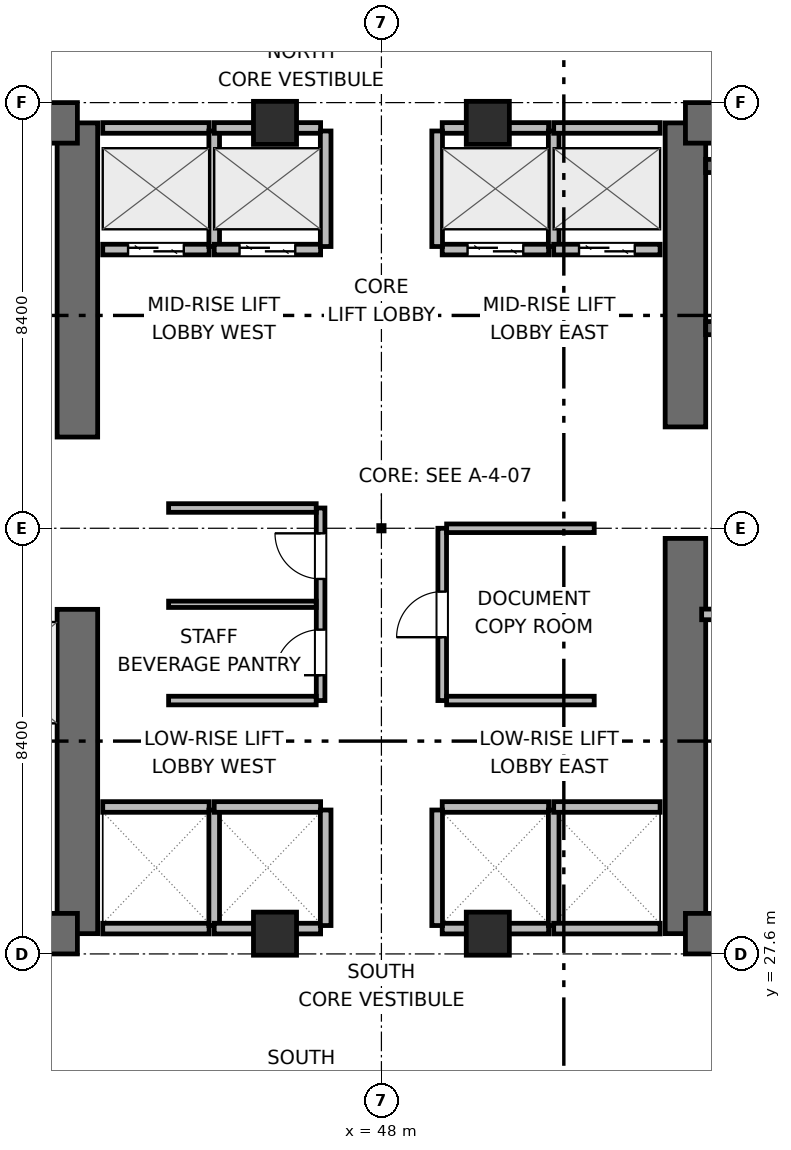
"""IFC4 building model, lengths in metres.
Left out: names, types, materials, properties, quantities, classifications, styles, units other than length and angle.
Written with IfcOpenShell. Run it as: python <this file> out.ifc"""

import sys

from ifc_helpers import new_model, si_unit, direction, frame, frame_2d, origin, origin_2d, place, context, subcontext, project, spatial, rectangle, extrude, element, fill, save


model = new_model("IFC4")
c1 = context("Model", 3, precision=1e-05, world=origin(), true_north=direction((0.0, 1.0)))
c2 = subcontext(c1, "Body", "Model", "MODEL_VIEW")
j1 = project(units=[si_unit("LENGTHUNIT", "METRE"), si_unit("PLANEANGLEUNIT", "RADIAN")], contexts=[c1])
p1 = place(None, origin())
s1 = spatial("IfcSite", under=j1, at=p1, CompositionType="ELEMENT")
p2 = place(p1, origin())
s2 = spatial("IfcBuilding", under=s1, at=p2, CompositionType="ELEMENT")
p3 = place(p2, frame((0.0, 0.0, 120.9)))
s3 = spatial("IfcBuildingStorey", under=s2, at=p3, CompositionType="ELEMENT", Elevation=120.9)
p4 = place(p3, frame((42.0, 28.0, 0.0), z_axis=(0.0, 0.0, 1.0), x_axis=(0.0, 1.0, 0.0)))
e1 = element("IfcWall", 1, at=p4, inside=s3, PredefinedType="SHEAR", context=c2, shape_type="SweptSolid", body=[
    extrude(rectangle(XDim=6.4, YDim=0.8, at=frame_2d((3.2, 0.0))), origin(), (0.0, 0.0, 1.0), 4.5),
])
p5 = place(p3, frame((42.0, 37.8, 0.0), z_axis=(0.0, 0.0, 1.0), x_axis=(0.0, 1.0, 0.0)))
e2 = element("IfcWall", 2, at=p5, inside=s3, PredefinedType="SHEAR", context=c2, shape_type="SweptSolid", body=[
    extrude(rectangle(XDim=6.2, YDim=0.8, at=frame_2d((3.1, 0.0))), origin(), (0.0, 0.0, 1.0), 4.5),
])
p6 = place(p3, frame((32.8, 28.0, 0.0), z_axis=(0.0, 0.0, 1.0), x_axis=(1.0, 0.0, 0.0)))
e3 = element("IfcWall", 3, at=p6, inside=s3, PredefinedType="SHEAR", context=c2, shape_type="SweptSolid", body=[
    extrude(rectangle(XDim=9.2, YDim=0.8, at=frame_2d((4.6, 0.0))), origin(), (0.0, 0.0, 1.0), 4.5),
])
p7 = place(p6, frame((4.975, 0.0, 0.0)))
e4 = element("IfcOpeningElement", 4, at=p7, cuts=e3, PredefinedType="OPENING", context=c2, shape_type="SweptSolid", body=[
    extrude(rectangle(XDim=1.05, YDim=2.04, at=frame_2d((0.525, 1.02))), frame((0.0, 0.41, 0.0), z_axis=(0.0, -1.0, 0.0), x_axis=(1.0, 0.0, 0.0)), (0.0, 0.0, 1.0), 0.82),
])
p8 = place(p3, frame((32.8, 44.0, 0.0), z_axis=(0.0, 0.0, 1.0), x_axis=(1.0, 0.0, 0.0)))
e5 = element("IfcWall", 5, at=p8, inside=s3, PredefinedType="SHEAR", context=c2, shape_type="SweptSolid", body=[
    extrude(rectangle(XDim=9.2, YDim=0.8, at=frame_2d((4.6, 0.0))), origin(), (0.0, 0.0, 1.0), 4.5),
])
p9 = place(p8, frame((0.975, 0.0, 0.0)))
e6 = element("IfcOpeningElement", 6, at=p9, cuts=e5, PredefinedType="OPENING", context=c2, shape_type="SweptSolid", body=[
    extrude(rectangle(XDim=0.95, YDim=2.04, at=frame_2d((0.475, 1.02))), frame((0.0, 0.41, 0.0), z_axis=(0.0, -1.0, 0.0), x_axis=(1.0, 0.0, 0.0)), (0.0, 0.0, 1.0), 0.82),
])
p10 = place(p8, frame((4.225, 0.0, 0.0)))
e7 = element("IfcOpeningElement", 7, at=p10, cuts=e5, PredefinedType="OPENING", context=c2, shape_type="SweptSolid", body=[
    extrude(rectangle(XDim=0.9, YDim=2.02, at=frame_2d((0.45, 1.01))), frame((0.0, 0.41, 0.0), z_axis=(0.0, -1.0, 0.0), x_axis=(1.0, 0.0, 0.0)), (0.0, 0.0, 1.0), 0.82),
])
p11 = place(p8, frame((7.125, 0.0, 0.0)))
e8 = element("IfcOpeningElement", 8, at=p11, cuts=e5, PredefinedType="OPENING", context=c2, shape_type="SweptSolid", body=[
    extrude(rectangle(XDim=0.9, YDim=2.02, at=frame_2d((0.45, 1.01))), frame((0.0, 0.41, 0.0), z_axis=(0.0, -1.0, 0.0), x_axis=(1.0, 0.0, 0.0)), (0.0, 0.0, 1.0), 0.82),
])
p12 = place(p3, frame((54.0, 28.0, 0.0), z_axis=(0.0, 0.0, 1.0), x_axis=(0.0, 1.0, 0.0)))
e9 = element("IfcWall", 9, at=p12, inside=s3, PredefinedType="SHEAR", context=c2, shape_type="SweptSolid", body=[
    extrude(rectangle(XDim=7.8, YDim=0.8, at=frame_2d((3.9, 0.0))), origin(), (0.0, 0.0, 1.0), 4.5),
])
p13 = place(p3, frame((54.0, 38.0, 0.0), z_axis=(0.0, 0.0, 1.0), x_axis=(0.0, 1.0, 0.0)))
e10 = element("IfcWall", 10, at=p13, inside=s3, PredefinedType="SHEAR", context=c2, shape_type="SweptSolid", body=[
    extrude(rectangle(XDim=6.0, YDim=0.8, at=frame_2d((3.0, 0.0))), origin(), (0.0, 0.0, 1.0), 4.5),
])
p14 = place(p3, frame((54.0, 28.0, 0.0), z_axis=(0.0, 0.0, 1.0), x_axis=(1.0, 0.0, 0.0)))
e11 = element("IfcWall", 11, at=p14, inside=s3, PredefinedType="SHEAR", context=c2, shape_type="SweptSolid", body=[
    extrude(rectangle(XDim=9.2, YDim=0.8, at=frame_2d((4.6, 0.0))), origin(), (0.0, 0.0, 1.0), 4.5),
])
p15 = place(p14, frame((3.925, 0.0, 0.0)))
e12 = element("IfcOpeningElement", 12, at=p15, cuts=e11, PredefinedType="OPENING", context=c2, shape_type="SweptSolid", body=[
    extrude(rectangle(XDim=1.05, YDim=2.04, at=frame_2d((0.525, 1.02))), frame((0.0, 0.41, 0.0), z_axis=(0.0, -1.0, 0.0), x_axis=(1.0, 0.0, 0.0)), (0.0, 0.0, 1.0), 0.82),
])
p16 = place(p3, frame((54.0, 44.0, 0.0), z_axis=(0.0, 0.0, 1.0), x_axis=(1.0, 0.0, 0.0)))
e13 = element("IfcWall", 13, at=p16, inside=s3, PredefinedType="SHEAR", context=c2, shape_type="SweptSolid", body=[
    extrude(rectangle(XDim=9.2, YDim=0.8, at=frame_2d((4.6, 0.0))), origin(), (0.0, 0.0, 1.0), 4.5),
])
p17 = place(p3, frame((54.4, 39.95, 0.0), z_axis=(0.0, 0.0, 1.0), x_axis=(1.0, 0.0, 0.0)))
e14 = element("IfcWall", 14, at=p17, inside=s3, PredefinedType="SHEAR", context=c2, shape_type="SweptSolid", body=[
    extrude(rectangle(XDim=8.4, YDim=0.26, at=frame_2d((4.2, 0.0))), origin(), (0.0, 0.0, 1.0), 4.5),
])
p18 = place(p17, frame((0.8, 0.0, 0.0)))
e15 = element("IfcOpeningElement", 15, at=p18, cuts=e14, PredefinedType="OPENING", context=c2, shape_type="SweptSolid", body=[
    extrude(rectangle(XDim=1.0, YDim=2.04, at=frame_2d((0.5, 1.02))), frame((0.0, 0.14, 0.0), z_axis=(0.0, -1.0, 0.0), x_axis=(1.0, 0.0, 0.0)), (0.0, 0.0, 1.0), 0.28),
])
p19 = place(p3, frame((54.4, 43.15, 0.0), z_axis=(0.0, 0.0, 1.0), x_axis=(1.0, 0.0, 0.0)))
e16 = element("IfcWall", 16, at=p19, inside=s3, PredefinedType="SHEAR", context=c2, shape_type="SweptSolid", body=[
    extrude(rectangle(XDim=8.4, YDim=0.26, at=frame_2d((4.2, 0.0))), origin(), (0.0, 0.0, 1.0), 4.5),
])
for number, where, z_axis, x_axis in (
    (17, (45.9, 28.0, 0.0), (0.0, 0.0, 1.0), (1.0, 0.0, 0.0)),
    (18, (50.1, 28.0, 0.0), (0.0, 0.0, 1.0), (1.0, 0.0, 0.0)),
    (19, (45.9, 44.0, 0.0), (0.0, 0.0, 1.0), (1.0, 0.0, 0.0)),
    (20, (50.1, 44.0, 0.0), (0.0, 0.0, 1.0), (1.0, 0.0, 0.0)),
):
    element("IfcColumn", number, at=place(p3, frame(where, z_axis=z_axis, x_axis=x_axis)), inside=s3, PredefinedType="COLUMN", context=c2, shape_type="SweptSolid", body=[
        extrude(rectangle(XDim=0.85, YDim=0.85, at=origin_2d()), origin(), (0.0, 0.0, 1.0), 4.5),
    ])
p20 = place(p3, frame((54.32, 34.3, 0.0), z_axis=(0.0, 0.0, 1.0), x_axis=(1.0, 0.0, 0.0)))
e21 = element("IfcWall", 21, at=p20, inside=s3, PredefinedType="PARTITIONING", context=c2, shape_type="SweptSolid", body=[
    extrude(rectangle(XDim=3.48, YDim=0.21, at=frame_2d((1.74, 0.0))), origin(), (0.0, 0.0, 1.0), 4.24),
])
p21 = place(p3, frame((42.5, 30.5, 0.0), z_axis=(0.0, 0.0, 1.0), x_axis=(1.0, 0.0, 0.0)))
e22 = element("IfcWall", 22, at=p21, inside=s3, PredefinedType="PARTITIONING", context=c2, shape_type="SweptSolid", body=[
    extrude(rectangle(XDim=2.1, YDim=0.21, at=frame_2d((1.05, 0.0))), origin(), (0.0, 0.0, 1.0), 4.24),
])
p22 = place(p3, frame((42.5, 28.1, 0.0), z_axis=(0.0, 0.0, 1.0), x_axis=(1.0, 0.0, 0.0)))
e23 = element("IfcWall", 23, at=p22, inside=s3, PredefinedType="PARTITIONING", context=c2, shape_type="SweptSolid", body=[
    extrude(rectangle(XDim=2.1, YDim=0.21, at=frame_2d((1.05, 0.0))), origin(), (0.0, 0.0, 1.0), 3.125),
])
p23 = place(p3, frame((44.7, 28.16, 0.0), z_axis=(0.0, 0.0, 1.0), x_axis=(0.0, 1.0, 0.0)))
e24 = element("IfcWall", 24, at=p23, inside=s3, PredefinedType="PARTITIONING", context=c2, shape_type="SweptSolid", body=[
    extrude(rectangle(XDim=2.28, YDim=0.21, at=frame_2d((1.14, 0.0))), origin(), (0.0, 0.0, 1.0), 4.24),
])
p24 = place(p3, frame((44.7, 30.5, 0.0), z_axis=(0.0, 0.0, 1.0), x_axis=(1.0, 0.0, 0.0)))
e25 = element("IfcWall", 25, at=p24, inside=s3, PredefinedType="PARTITIONING", context=c2, shape_type="SweptSolid", body=[
    extrude(rectangle(XDim=2.1, YDim=0.21, at=frame_2d((1.05, 0.0))), origin(), (0.0, 0.0, 1.0), 4.24),
])
p25 = place(p3, frame((44.7, 28.1, 0.0), z_axis=(0.0, 0.0, 1.0), x_axis=(1.0, 0.0, 0.0)))
e26 = element("IfcWall", 26, at=p25, inside=s3, PredefinedType="PARTITIONING", context=c2, shape_type="SweptSolid", body=[
    extrude(rectangle(XDim=2.1, YDim=0.21, at=frame_2d((1.05, 0.0))), origin(), (0.0, 0.0, 1.0), 3.125),
])
p26 = place(p3, frame((46.9, 28.16, 0.0), z_axis=(0.0, 0.0, 1.0), x_axis=(0.0, 1.0, 0.0)))
e27 = element("IfcWall", 27, at=p26, inside=s3, PredefinedType="PARTITIONING", context=c2, shape_type="SweptSolid", body=[
    extrude(rectangle(XDim=2.28, YDim=0.21, at=frame_2d((1.14, 0.0))), origin(), (0.0, 0.0, 1.0), 4.24),
])
p27 = place(p3, frame((49.2, 30.5, 0.0), z_axis=(0.0, 0.0, 1.0), x_axis=(1.0, 0.0, 0.0)))
e28 = element("IfcWall", 28, at=p27, inside=s3, PredefinedType="PARTITIONING", context=c2, shape_type="SweptSolid", body=[
    extrude(rectangle(XDim=2.1, YDim=0.21, at=frame_2d((1.05, 0.0))), origin(), (0.0, 0.0, 1.0), 4.24),
])
p28 = place(p3, frame((49.2, 28.1, 0.0), z_axis=(0.0, 0.0, 1.0), x_axis=(1.0, 0.0, 0.0)))
e29 = element("IfcWall", 29, at=p28, inside=s3, PredefinedType="PARTITIONING", context=c2, shape_type="SweptSolid", body=[
    extrude(rectangle(XDim=2.1, YDim=0.21, at=frame_2d((1.05, 0.0))), origin(), (0.0, 0.0, 1.0), 3.125),
])
for number, where, z_axis, x_axis in (
    (30, (49.1, 28.16, 0.0), (0.0, 0.0, 1.0), (0.0, 1.0, 0.0)),
    (31, (51.4, 28.16, 0.0), (0.0, 0.0, 1.0), (0.0, 1.0, 0.0)),
):
    element("IfcWall", number, at=place(p3, frame(where, z_axis=z_axis, x_axis=x_axis)), inside=s3, PredefinedType="PARTITIONING", context=c2, shape_type="SweptSolid", body=[
        extrude(rectangle(XDim=2.28, YDim=0.21, at=frame_2d((1.14, 0.0))), origin(), (0.0, 0.0, 1.0), 4.24),
    ])
p29 = place(p3, frame((51.4, 30.5, 0.0), z_axis=(0.0, 0.0, 1.0), x_axis=(1.0, 0.0, 0.0)))
e32 = element("IfcWall", 32, at=p29, inside=s3, PredefinedType="PARTITIONING", context=c2, shape_type="SweptSolid", body=[
    extrude(rectangle(XDim=2.1, YDim=0.21, at=frame_2d((1.05, 0.0))), origin(), (0.0, 0.0, 1.0), 4.24),
])
p30 = place(p3, frame((51.4, 28.1, 0.0), z_axis=(0.0, 0.0, 1.0), x_axis=(1.0, 0.0, 0.0)))
e33 = element("IfcWall", 33, at=p30, inside=s3, PredefinedType="PARTITIONING", context=c2, shape_type="SweptSolid", body=[
    extrude(rectangle(XDim=2.1, YDim=0.21, at=frame_2d((1.05, 0.0))), origin(), (0.0, 0.0, 1.0), 3.125),
])
p31 = place(p3, frame((42.5, 41.5, 0.0), z_axis=(0.0, 0.0, 1.0), x_axis=(1.0, 0.0, 0.0)))
e34 = element("IfcWall", 34, at=p31, inside=s3, PredefinedType="PARTITIONING", context=c2, shape_type="SweptSolid", body=[
    extrude(rectangle(XDim=2.1, YDim=0.21, at=frame_2d((1.05, 0.0))), origin(), (0.0, 0.0, 1.0), 4.24),
])
p32 = place(p31, frame((0.5, 0.0, 0.0)))
e35 = element("IfcOpeningElement", 35, at=p32, cuts=e34, PredefinedType="OPENING", context=c2, shape_type="SweptSolid", body=[
    extrude(rectangle(XDim=1.1, YDim=2.04, at=frame_2d((0.55, 1.02))), frame((0.0, 0.115, 0.0), z_axis=(0.0, -1.0, 0.0), x_axis=(1.0, 0.0, 0.0)), (0.0, 0.0, 1.0), 0.23),
])
p33 = place(p3, frame((42.5, 43.9, 0.0), z_axis=(0.0, 0.0, 1.0), x_axis=(1.0, 0.0, 0.0)))
e36 = element("IfcWall", 36, at=p33, inside=s3, PredefinedType="PARTITIONING", context=c2, shape_type="SweptSolid", body=[
    extrude(rectangle(XDim=2.1, YDim=0.21, at=frame_2d((1.05, 0.0))), origin(), (0.0, 0.0, 1.0), 3.125),
])
p34 = place(p3, frame((44.7, 41.56, 0.0), z_axis=(0.0, 0.0, 1.0), x_axis=(0.0, 1.0, 0.0)))
e37 = element("IfcWall", 37, at=p34, inside=s3, PredefinedType="PARTITIONING", context=c2, shape_type="SweptSolid", body=[
    extrude(rectangle(XDim=2.28, YDim=0.21, at=frame_2d((1.14, 0.0))), origin(), (0.0, 0.0, 1.0), 4.24),
])
p35 = place(p3, frame((44.7, 41.5, 0.0), z_axis=(0.0, 0.0, 1.0), x_axis=(1.0, 0.0, 0.0)))
e38 = element("IfcWall", 38, at=p35, inside=s3, PredefinedType="PARTITIONING", context=c2, shape_type="SweptSolid", body=[
    extrude(rectangle(XDim=2.1, YDim=0.21, at=frame_2d((1.05, 0.0))), origin(), (0.0, 0.0, 1.0), 4.24),
])
p36 = place(p35, frame((0.5, 0.0, 0.0)))
e39 = element("IfcOpeningElement", 39, at=p36, cuts=e38, PredefinedType="OPENING", context=c2, shape_type="SweptSolid", body=[
    extrude(rectangle(XDim=1.1, YDim=2.04, at=frame_2d((0.55, 1.02))), frame((0.0, 0.115, 0.0), z_axis=(0.0, -1.0, 0.0), x_axis=(1.0, 0.0, 0.0)), (0.0, 0.0, 1.0), 0.23),
])
p37 = place(p3, frame((44.7, 43.9, 0.0), z_axis=(0.0, 0.0, 1.0), x_axis=(1.0, 0.0, 0.0)))
e40 = element("IfcWall", 40, at=p37, inside=s3, PredefinedType="PARTITIONING", context=c2, shape_type="SweptSolid", body=[
    extrude(rectangle(XDim=2.1, YDim=0.21, at=frame_2d((1.05, 0.0))), origin(), (0.0, 0.0, 1.0), 3.125),
])
p38 = place(p3, frame((46.9, 41.56, 0.0), z_axis=(0.0, 0.0, 1.0), x_axis=(0.0, 1.0, 0.0)))
e41 = element("IfcWall", 41, at=p38, inside=s3, PredefinedType="PARTITIONING", context=c2, shape_type="SweptSolid", body=[
    extrude(rectangle(XDim=2.28, YDim=0.21, at=frame_2d((1.14, 0.0))), origin(), (0.0, 0.0, 1.0), 4.24),
])
p39 = place(p3, frame((49.2, 41.5, 0.0), z_axis=(0.0, 0.0, 1.0), x_axis=(1.0, 0.0, 0.0)))
e42 = element("IfcWall", 42, at=p39, inside=s3, PredefinedType="PARTITIONING", context=c2, shape_type="SweptSolid", body=[
    extrude(rectangle(XDim=2.1, YDim=0.21, at=frame_2d((1.05, 0.0))), origin(), (0.0, 0.0, 1.0), 4.24),
])
p40 = place(p39, frame((0.5, 0.0, 0.0)))
e43 = element("IfcOpeningElement", 43, at=p40, cuts=e42, PredefinedType="OPENING", context=c2, shape_type="SweptSolid", body=[
    extrude(rectangle(XDim=1.1, YDim=2.04, at=frame_2d((0.55, 1.02))), frame((0.0, 0.115, 0.0), z_axis=(0.0, -1.0, 0.0), x_axis=(1.0, 0.0, 0.0)), (0.0, 0.0, 1.0), 0.23),
])
p41 = place(p3, frame((49.2, 43.9, 0.0), z_axis=(0.0, 0.0, 1.0), x_axis=(1.0, 0.0, 0.0)))
e44 = element("IfcWall", 44, at=p41, inside=s3, PredefinedType="PARTITIONING", context=c2, shape_type="SweptSolid", body=[
    extrude(rectangle(XDim=2.1, YDim=0.21, at=frame_2d((1.05, 0.0))), origin(), (0.0, 0.0, 1.0), 3.125),
])
for number, where, z_axis, x_axis in (
    (45, (49.1, 41.56, 0.0), (0.0, 0.0, 1.0), (0.0, 1.0, 0.0)),
    (46, (51.4, 41.56, 0.0), (0.0, 0.0, 1.0), (0.0, 1.0, 0.0)),
):
    element("IfcWall", number, at=place(p3, frame(where, z_axis=z_axis, x_axis=x_axis)), inside=s3, PredefinedType="PARTITIONING", context=c2, shape_type="SweptSolid", body=[
        extrude(rectangle(XDim=2.28, YDim=0.21, at=frame_2d((1.14, 0.0))), origin(), (0.0, 0.0, 1.0), 4.24),
    ])
p42 = place(p3, frame((51.4, 41.5, 0.0), z_axis=(0.0, 0.0, 1.0), x_axis=(1.0, 0.0, 0.0)))
e47 = element("IfcWall", 47, at=p42, inside=s3, PredefinedType="PARTITIONING", context=c2, shape_type="SweptSolid", body=[
    extrude(rectangle(XDim=2.1, YDim=0.21, at=frame_2d((1.05, 0.0))), origin(), (0.0, 0.0, 1.0), 4.24),
])
p43 = place(p42, frame((0.5, 0.0, 0.0)))
e48 = element("IfcOpeningElement", 48, at=p43, cuts=e47, PredefinedType="OPENING", context=c2, shape_type="SweptSolid", body=[
    extrude(rectangle(XDim=1.1, YDim=2.04, at=frame_2d((0.55, 1.02))), frame((0.0, 0.115, 0.0), z_axis=(0.0, -1.0, 0.0), x_axis=(1.0, 0.0, 0.0)), (0.0, 0.0, 1.0), 0.23),
])
p44 = place(p3, frame((51.4, 43.9, 0.0), z_axis=(0.0, 0.0, 1.0), x_axis=(1.0, 0.0, 0.0)))
e49 = element("IfcWall", 49, at=p44, inside=s3, PredefinedType="PARTITIONING", context=c2, shape_type="SweptSolid", body=[
    extrude(rectangle(XDim=2.1, YDim=0.21, at=frame_2d((1.05, 0.0))), origin(), (0.0, 0.0, 1.0), 3.125),
])
p45 = place(p3, frame((46.8, 32.6, 0.0), z_axis=(0.0, 0.0, 1.0), x_axis=(0.0, 1.0, 0.0)))
e50 = element("IfcWall", 50, at=p45, inside=s3, PredefinedType="PARTITIONING", context=c2, shape_type="SweptSolid", body=[
    extrude(rectangle(XDim=3.8, YDim=0.17, at=frame_2d((1.9, 0.0))), origin(), (0.0, 0.0, 1.0), 4.24),
])
p46 = place(p45, frame((0.5, 0.0, 0.0)))
e51 = element("IfcOpeningElement", 51, at=p46, cuts=e50, PredefinedType="OPENING", context=c2, shape_type="SweptSolid", body=[
    extrude(rectangle(XDim=0.9, YDim=2.02, at=frame_2d((0.45, 1.01))), frame((0.0, 0.095, 0.0), z_axis=(0.0, -1.0, 0.0), x_axis=(1.0, 0.0, 0.0)), (0.0, 0.0, 1.0), 0.19),
])
p47 = place(p45, frame((2.4, 0.0, 0.0)))
e52 = element("IfcOpeningElement", 52, at=p47, cuts=e50, PredefinedType="OPENING", context=c2, shape_type="SweptSolid", body=[
    extrude(rectangle(XDim=0.9, YDim=2.02, at=frame_2d((0.45, 1.01))), frame((0.0, 0.095, 0.0), z_axis=(0.0, -1.0, 0.0), x_axis=(1.0, 0.0, 0.0)), (0.0, 0.0, 1.0), 0.19),
])
for number, where, z_axis, x_axis in (
    (53, (43.8, 32.6, 0.0), (0.0, 0.0, 1.0), (1.0, 0.0, 0.0)),
    (54, (43.8, 36.4, 0.0), (0.0, 0.0, 1.0), (1.0, 0.0, 0.0)),
):
    element("IfcWall", number, at=place(p3, frame(where, z_axis=z_axis, x_axis=x_axis)), inside=s3, PredefinedType="PARTITIONING", context=c2, shape_type="SweptSolid", body=[
        extrude(rectangle(XDim=2.913, YDim=0.17, at=frame_2d((1.457, 0.0))), origin(), (0.0, 0.0, 1.0), 4.24),
    ])
p48 = place(p3, frame((43.8, 34.5, 0.0), z_axis=(0.0, 0.0, 1.0), x_axis=(1.0, 0.0, 0.0)))
e55 = element("IfcWall", 55, at=p48, inside=s3, PredefinedType="PARTITIONING", context=c2, shape_type="SweptSolid", body=[
    extrude(rectangle(XDim=2.913, YDim=0.125, at=frame_2d((1.457, 0.0))), origin(), (0.0, 0.0, 1.0), 4.24),
])
p49 = place(p3, frame((49.2, 32.6, 0.0), z_axis=(0.0, 0.0, 1.0), x_axis=(0.0, 1.0, 0.0)))
e56 = element("IfcWall", 56, at=p49, inside=s3, PredefinedType="PARTITIONING", context=c2, shape_type="SweptSolid", body=[
    extrude(rectangle(XDim=3.4, YDim=0.17, at=frame_2d((1.7, 0.0))), origin(), (0.0, 0.0, 1.0), 4.24),
])
p50 = place(p49, frame((1.25, 0.0, 0.0)))
e57 = element("IfcOpeningElement", 57, at=p50, cuts=e56, PredefinedType="OPENING", context=c2, shape_type="SweptSolid", body=[
    extrude(rectangle(XDim=0.9, YDim=2.02, at=frame_2d((0.45, 1.01))), frame((0.0, 0.095, 0.0), z_axis=(0.0, -1.0, 0.0), x_axis=(1.0, 0.0, 0.0)), (0.0, 0.0, 1.0), 0.19),
])
for number, where, z_axis, x_axis in (
    (58, (49.287, 32.6, 0.0), (0.0, 0.0, 1.0), (1.0, 0.0, 0.0)),
    (59, (49.287, 36.0, 0.0), (0.0, 0.0, 1.0), (1.0, 0.0, 0.0)),
):
    element("IfcWall", number, at=place(p3, frame(where, z_axis=z_axis, x_axis=x_axis)), inside=s3, PredefinedType="PARTITIONING", context=c2, shape_type="SweptSolid", body=[
        extrude(rectangle(XDim=2.913, YDim=0.17, at=frame_2d((1.457, 0.0))), origin(), (0.0, 0.0, 1.0), 4.24),
    ])
p51 = place(p32, origin())
e60 = element("IfcDoor", 60, at=p51, inside=s3, OperationType="DOUBLE_DOOR_SLIDING", PredefinedType="DOOR", context=c2, shape_type="SweptSolid", body=[
    extrude(rectangle(XDim=1.1, YDim=2.04, at=frame_2d((0.55, 1.02))), frame((0.0, 0.025, 0.0), z_axis=(0.0, -1.0, 0.0), x_axis=(1.0, 0.0, 0.0)), (0.0, 0.0, 1.0), 0.05),
])
fill(e35, e60)
p52 = place(p36, origin())
e61 = element("IfcDoor", 61, at=p52, inside=s3, OperationType="DOUBLE_DOOR_SLIDING", PredefinedType="DOOR", context=c2, shape_type="SweptSolid", body=[
    extrude(rectangle(XDim=1.1, YDim=2.04, at=frame_2d((0.55, 1.02))), frame((0.0, 0.025, 0.0), z_axis=(0.0, -1.0, 0.0), x_axis=(1.0, 0.0, 0.0)), (0.0, 0.0, 1.0), 0.05),
])
fill(e39, e61)
p53 = place(p40, origin())
e62 = element("IfcDoor", 62, at=p53, inside=s3, OperationType="DOUBLE_DOOR_SLIDING", PredefinedType="DOOR", context=c2, shape_type="SweptSolid", body=[
    extrude(rectangle(XDim=1.1, YDim=2.04, at=frame_2d((0.55, 1.02))), frame((0.0, 0.025, 0.0), z_axis=(0.0, -1.0, 0.0), x_axis=(1.0, 0.0, 0.0)), (0.0, 0.0, 1.0), 0.05),
])
fill(e43, e62)
p54 = place(p43, origin())
e63 = element("IfcDoor", 63, at=p54, inside=s3, OperationType="DOUBLE_DOOR_SLIDING", PredefinedType="DOOR", context=c2, shape_type="SweptSolid", body=[
    extrude(rectangle(XDim=1.1, YDim=2.04, at=frame_2d((0.55, 1.02))), frame((0.0, 0.025, 0.0), z_axis=(0.0, -1.0, 0.0), x_axis=(1.0, 0.0, 0.0)), (0.0, 0.0, 1.0), 0.05),
])
fill(e48, e63)
p55 = place(p46, origin())
e64 = element("IfcDoor", 64, at=p55, inside=s3, OperationType="SINGLE_SWING_LEFT", PredefinedType="DOOR", context=c2, shape_type="SweptSolid", body=[
    extrude(rectangle(XDim=0.9, YDim=2.02, at=frame_2d((0.45, 1.01))), frame((0.0, 0.025, 0.0), z_axis=(0.0, -1.0, 0.0), x_axis=(1.0, 0.0, 0.0)), (0.0, 0.0, 1.0), 0.05),
])
fill(e51, e64)
p56 = place(p47, origin())
e65 = element("IfcDoor", 65, at=p56, inside=s3, OperationType="SINGLE_SWING_RIGHT", PredefinedType="DOOR", context=c2, shape_type="SweptSolid", body=[
    extrude(rectangle(XDim=0.9, YDim=2.02, at=frame_2d((0.45, 1.01))), frame((0.0, 0.025, 0.0), z_axis=(0.0, -1.0, 0.0), x_axis=(1.0, 0.0, 0.0)), (0.0, 0.0, 1.0), 0.05),
])
fill(e52, e65)
p57 = place(p50, origin())
e66 = element("IfcDoor", 66, at=p57, inside=s3, OperationType="SINGLE_SWING_LEFT", PredefinedType="DOOR", context=c2, shape_type="SweptSolid", body=[
    extrude(rectangle(XDim=0.9, YDim=2.02, at=frame_2d((0.45, 1.01))), frame((0.0, 0.025, 0.0), z_axis=(0.0, -1.0, 0.0), x_axis=(1.0, 0.0, 0.0)), (0.0, 0.0, 1.0), 0.05),
])
fill(e57, e66)
save(model, sys.argv[1])
